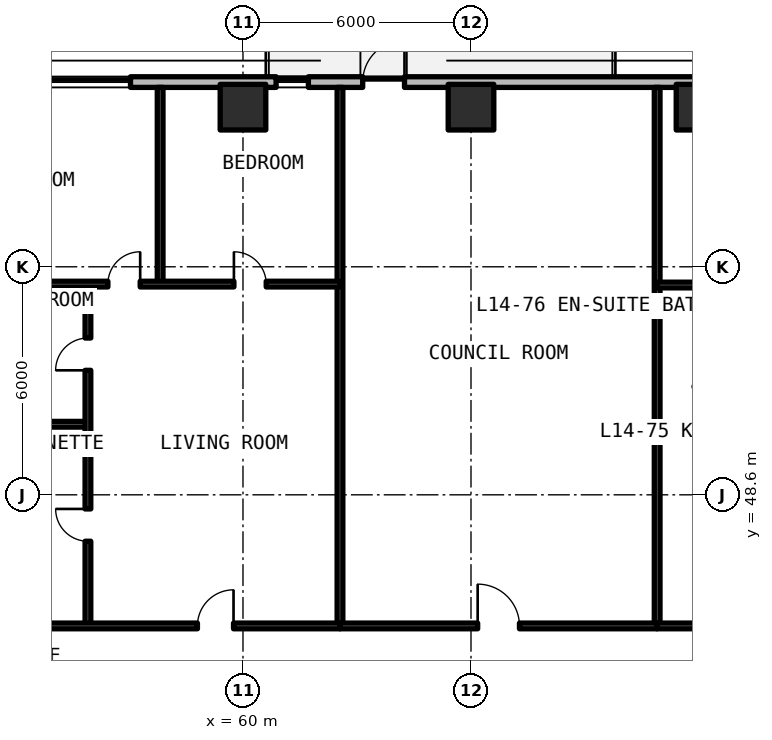
"""IFC4 building model, lengths in metres.
Left out: names, types, materials, properties, quantities, classifications, styles, units other than length and angle.
Written with IfcOpenShell. Run it as: python <this file> out.ifc"""

import sys

from ifc_helpers import new_model, si_unit, direction, frame, frame_2d, origin, origin_2d, place, context, subcontext, project, spatial, rectangle, extrude, element, fill, save


model = new_model("IFC4")
c1 = context("Model", 3, precision=1e-05, world=origin(), true_north=direction((0.0, 1.0)))
c2 = subcontext(c1, "Body", "Model", "MODEL_VIEW")
j1 = project(units=[si_unit("LENGTHUNIT", "METRE"), si_unit("PLANEANGLEUNIT", "RADIAN")], contexts=[c1])
p1 = place(None, origin())
s1 = spatial("IfcSite", under=j1, at=p1, CompositionType="ELEMENT")
p2 = place(p1, origin())
s2 = spatial("IfcBuilding", under=s1, at=p2, CompositionType="ELEMENT")
p3 = place(p2, frame((0.0, 0.0, 52.14)))
s3 = spatial("IfcBuildingStorey", under=s2, at=p3, CompositionType="ELEMENT", Elevation=52.14)
for number, where, z_axis, x_axis in (
    (1, (60.0, 58.8, 0.0), (0.0, 0.0, 1.0), (1.0, 0.0, 0.0)),
    (2, (66.0, 58.8, 0.0), (0.0, 0.0, 1.0), (1.0, 0.0, 0.0)),
    (3, (72.0, 58.8, 0.0), (0.0, 0.0, 1.0), (1.0, 0.0, 0.0)),
):
    element("IfcColumn", number, at=place(p3, frame(where, z_axis=z_axis, x_axis=x_axis)), inside=s3, PredefinedType="COLUMN", context=c2, shape_type="SweptSolid", body=[
        extrude(rectangle(XDim=1.2, YDim=1.2, at=origin_2d()), origin(), (0.0, 0.0, 1.0), 3.3),
    ])
p4 = place(p3, frame((96.542, 59.46, 0.0), z_axis=(0.0, 0.0, 1.0), x_axis=(-1.0, 0.0, 0.0)))
e4 = element("IfcWall", 4, at=p4, inside=s3, PredefinedType="SOLIDWALL", context=c2, shape_type="SweptSolid", body=[
    extrude(rectangle(XDim=44.402, YDim=0.28, at=frame_2d((22.201, 0.0))), origin(), (0.0, 0.0, 1.0), 3.08),
])
p5 = place(p4, frame((32.292, 0.0, 0.0)))
e5 = element("IfcOpeningElement", 5, at=p5, cuts=e4, PredefinedType="OPENING", context=c2, shape_type="SweptSolid", body=[
    extrude(rectangle(XDim=1.1, YDim=2.15, at=frame_2d((0.55, 1.075))), frame((0.0, 0.15, 0.0), z_axis=(0.0, -1.0, 0.0), x_axis=(1.0, 0.0, 0.0)), (0.0, 0.0, 1.0), 0.3),
])
p6 = place(p4, frame((20.692, 0.0, 0.0)))
e6 = element("IfcOpeningElement", 6, at=p6, cuts=e4, PredefinedType="OPENING", context=c2, shape_type="SweptSolid", body=[
    extrude(rectangle(XDim=1.1, YDim=2.15, at=frame_2d((0.55, 1.075))), frame((0.0, 0.15, 0.0), z_axis=(0.0, -1.0, 0.0), x_axis=(1.0, 0.0, 0.0)), (0.0, 0.0, 1.0), 0.3),
])
p7 = place(p4, frame((8.342, 0.0, 0.0)))
e7 = element("IfcOpeningElement", 7, at=p7, cuts=e4, PredefinedType="OPENING", context=c2, shape_type="SweptSolid", body=[
    extrude(rectangle(XDim=1.1, YDim=2.15, at=frame_2d((0.55, 1.075))), frame((0.0, 0.15, 0.0), z_axis=(0.0, -1.0, 0.0), x_axis=(1.0, 0.0, 0.0)), (0.0, 0.0, 1.0), 0.3),
])
p8 = place(p4, frame((39.502, 0.0, 0.78)))
e8 = element("IfcOpeningElement", 8, at=p8, cuts=e4, PredefinedType="OPENING", context=c2, shape_type="SweptSolid", body=[
    extrude(rectangle(XDim=2.2, YDim=1.66, at=frame_2d((1.1, 0.83))), frame((0.0, 0.15, 0.0), z_axis=(0.0, -1.0, 0.0), x_axis=(1.0, 0.0, 0.0)), (0.0, 0.0, 1.0), 0.3),
])
p9 = place(p4, frame((34.821, 0.0, 0.78)))
e9 = element("IfcOpeningElement", 9, at=p9, cuts=e4, PredefinedType="OPENING", context=c2, shape_type="SweptSolid", body=[
    extrude(rectangle(XDim=0.85, YDim=1.65, at=frame_2d((0.425, 0.825))), frame((0.0, 0.15, 0.0), z_axis=(0.0, -1.0, 0.0), x_axis=(1.0, 0.0, 0.0)), (0.0, 0.0, 1.0), 0.3),
])
p10 = place(p4, frame((15.472, 0.0, 0.78)))
e10 = element("IfcOpeningElement", 10, at=p10, cuts=e4, PredefinedType="OPENING", context=c2, shape_type="SweptSolid", body=[
    extrude(rectangle(XDim=2.2, YDim=1.66, at=frame_2d((1.1, 0.83))), frame((0.0, 0.15, 0.0), z_axis=(0.0, -1.0, 0.0), x_axis=(1.0, 0.0, 0.0)), (0.0, 0.0, 1.0), 0.3),
])
p11 = place(p4, frame((2.288, 0.0, 0.78)))
e11 = element("IfcOpeningElement", 11, at=p11, cuts=e4, PredefinedType="OPENING", context=c2, shape_type="SweptSolid", body=[
    extrude(rectangle(XDim=2.2, YDim=1.66, at=frame_2d((1.1, 0.83))), frame((0.0, 0.15, 0.0), z_axis=(0.0, -1.0, 0.0), x_axis=(1.0, 0.0, 0.0)), (0.0, 0.0, 1.0), 0.3),
])
p12 = place(p3, frame((62.552, 45.15, 0.0), z_axis=(0.0, 0.0, 1.0), x_axis=(0.0, 1.0, 0.0)))
e12 = element("IfcWall", 12, at=p12, inside=s3, PredefinedType="SOLIDWALL", context=c2, shape_type="SweptSolid", body=[
    extrude(rectangle(XDim=14.17, YDim=0.15, at=frame_2d((7.085, 0.0))), origin(), (0.0, 0.0, 1.0), 2.35),
])
p13 = place(p3, frame((52.12, 50.457, 0.0), z_axis=(0.0, 0.0, 1.0), x_axis=(1.0, 0.0, 0.0)))
e13 = element("IfcWall", 13, at=p13, inside=s3, PredefinedType="PARTITIONING", context=c2, shape_type="SweptSolid", body=[
    extrude(rectangle(XDim=3.8, YDim=0.15, at=frame_2d((1.9, 0.0))), origin(), (0.0, 0.0, 1.0), 2.35),
])
p14 = place(p3, frame((55.92, 45.15, 0.0), z_axis=(0.0, 0.0, 1.0), x_axis=(0.0, 1.0, 0.0)))
e14 = element("IfcWall", 14, at=p14, inside=s3, PredefinedType="PARTITIONING", context=c2, shape_type="SweptSolid", body=[
    extrude(rectangle(XDim=8.995, YDim=0.15, at=frame_2d((4.497, 0.0))), origin(), (0.0, 0.0, 1.0), 2.35),
])
p15 = place(p14, frame((2.229, 0.0, 0.0)))
e15 = element("IfcOpeningElement", 15, at=p15, cuts=e14, PredefinedType="OPENING", context=c2, shape_type="SweptSolid", body=[
    extrude(rectangle(XDim=0.85, YDim=2.1, at=frame_2d((0.425, 1.05))), frame((0.0, 0.085, 0.0), z_axis=(0.0, -1.0, 0.0), x_axis=(1.0, 0.0, 0.0)), (0.0, 0.0, 1.0), 0.17),
])
p16 = place(p14, frame((6.726, 0.0, 0.0)))
e16 = element("IfcOpeningElement", 16, at=p16, cuts=e14, PredefinedType="OPENING", context=c2, shape_type="SweptSolid", body=[
    extrude(rectangle(XDim=0.85, YDim=2.1, at=frame_2d((0.425, 1.05))), frame((0.0, 0.085, 0.0), z_axis=(0.0, -1.0, 0.0), x_axis=(1.0, 0.0, 0.0)), (0.0, 0.0, 1.0), 0.17),
])
p17 = place(p3, frame((57.82, 54.145, 0.0), z_axis=(0.0, 0.0, 1.0), x_axis=(0.0, 1.0, 0.0)))
e17 = element("IfcWall", 17, at=p17, inside=s3, PredefinedType="PARTITIONING", context=c2, shape_type="SweptSolid", body=[
    extrude(rectangle(XDim=5.176, YDim=0.15, at=frame_2d((2.588, 0.0))), origin(), (0.0, 0.0, 1.0), 2.35),
])
p18 = place(p3, frame((52.12, 54.145, 0.0), z_axis=(0.0, 0.0, 1.0), x_axis=(1.0, 0.0, 0.0)))
e18 = element("IfcWall", 18, at=p18, inside=s3, PredefinedType="PARTITIONING", context=c2, shape_type="SweptSolid", body=[
    extrude(rectangle(XDim=10.432, YDim=0.15, at=frame_2d((5.216, 0.0))), origin(), (0.0, 0.0, 1.0), 2.35),
])
p19 = place(p18, frame((4.325, 0.0, 0.0)))
e19 = element("IfcOpeningElement", 19, at=p19, cuts=e18, PredefinedType="OPENING", context=c2, shape_type="SweptSolid", body=[
    extrude(rectangle(XDim=0.85, YDim=2.1, at=frame_2d((0.425, 1.05))), frame((0.0, 0.085, 0.0), z_axis=(0.0, -1.0, 0.0), x_axis=(1.0, 0.0, 0.0)), (0.0, 0.0, 1.0), 0.17),
])
p20 = place(p18, frame((7.641, 0.0, 0.0)))
e20 = element("IfcOpeningElement", 20, at=p20, cuts=e18, PredefinedType="OPENING", context=c2, shape_type="SweptSolid", body=[
    extrude(rectangle(XDim=0.85, YDim=2.1, at=frame_2d((0.425, 1.05))), frame((0.0, 0.085, 0.0), z_axis=(0.0, -1.0, 0.0), x_axis=(1.0, 0.0, 0.0)), (0.0, 0.0, 1.0), 0.17),
])
p21 = place(p3, frame((52.12, 45.15, 0.0), z_axis=(0.0, 0.0, 1.0), x_axis=(1.0, 0.0, 0.0)))
e21 = element("IfcWall", 21, at=p21, inside=s3, PredefinedType="SOLIDWALL", context=c2, shape_type="SweptSolid", body=[
    extrude(rectangle(XDim=10.432, YDim=0.15, at=frame_2d((5.216, 0.0))), origin(), (0.0, 0.0, 1.0), 2.35),
])
p22 = place(p21, frame((6.681, 0.0, 0.0)))
e22 = element("IfcOpeningElement", 22, at=p22, cuts=e21, PredefinedType="OPENING", context=c2, shape_type="SweptSolid", body=[
    extrude(rectangle(XDim=0.95, YDim=2.15, at=frame_2d((0.475, 1.075))), frame((0.0, 0.085, 0.0), z_axis=(0.0, -1.0, 0.0), x_axis=(1.0, 0.0, 0.0)), (0.0, 0.0, 1.0), 0.17),
])
p23 = place(p3, frame((70.898, 45.15, 0.0), z_axis=(0.0, 0.0, 1.0), x_axis=(0.0, 1.0, 0.0)))
e23 = element("IfcWall", 23, at=p23, inside=s3, PredefinedType="SOLIDWALL", context=c2, shape_type="SweptSolid", body=[
    extrude(rectangle(XDim=14.17, YDim=0.15, at=frame_2d((7.085, 0.0))), origin(), (0.0, 0.0, 1.0), 2.35),
])
p24 = place(p3, frame((62.552, 45.15, 0.0), z_axis=(0.0, 0.0, 1.0), x_axis=(1.0, 0.0, 0.0)))
e24 = element("IfcWall", 24, at=p24, inside=s3, PredefinedType="SOLIDWALL", context=c2, shape_type="SweptSolid", body=[
    extrude(rectangle(XDim=8.346, YDim=0.15, at=frame_2d((4.173, 0.0))), origin(), (0.0, 0.0, 1.0), 2.35),
])
p25 = place(p24, frame((3.623, 0.0, 0.0)))
e25 = element("IfcOpeningElement", 25, at=p25, cuts=e24, PredefinedType="OPENING", context=c2, shape_type="SweptSolid", body=[
    extrude(rectangle(XDim=1.1, YDim=2.15, at=frame_2d((0.55, 1.075))), frame((0.0, 0.085, 0.0), z_axis=(0.0, -1.0, 0.0), x_axis=(1.0, 0.0, 0.0)), (0.0, 0.0, 1.0), 0.17),
])
p26 = place(p3, frame((70.898, 50.442, 0.0), z_axis=(0.0, 0.0, 1.0), x_axis=(1.0, 0.0, 0.0)))
e26 = element("IfcWall", 26, at=p26, inside=s3, PredefinedType="PARTITIONING", context=c2, shape_type="SweptSolid", body=[
    extrude(rectangle(XDim=3.021, YDim=0.15, at=frame_2d((1.511, 0.0))), origin(), (0.0, 0.0, 1.0), 2.35),
])
p27 = place(p3, frame((70.898, 54.12, 0.0), z_axis=(0.0, 0.0, 1.0), x_axis=(1.0, 0.0, 0.0)))
e27 = element("IfcWall", 27, at=p27, inside=s3, PredefinedType="PARTITIONING", context=c2, shape_type="SweptSolid", body=[
    extrude(rectangle(XDim=10.896, YDim=0.15, at=frame_2d((5.448, 0.0))), origin(), (0.0, 0.0, 1.0), 2.35),
])
p28 = place(p27, frame((3.919, 0.0, 0.0)))
e28 = element("IfcOpeningElement", 28, at=p28, cuts=e27, PredefinedType="OPENING", context=c2, shape_type="SweptSolid", body=[
    extrude(rectangle(XDim=0.85, YDim=2.1, at=frame_2d((0.425, 1.05))), frame((0.0, 0.085, 0.0), z_axis=(0.0, -1.0, 0.0), x_axis=(1.0, 0.0, 0.0)), (0.0, 0.0, 1.0), 0.17),
])
p29 = place(p27, frame((7.856, 0.0, 0.0)))
e29 = element("IfcOpeningElement", 29, at=p29, cuts=e27, PredefinedType="OPENING", context=c2, shape_type="SweptSolid", body=[
    extrude(rectangle(XDim=0.85, YDim=2.1, at=frame_2d((0.425, 1.05))), frame((0.0, 0.085, 0.0), z_axis=(0.0, -1.0, 0.0), x_axis=(1.0, 0.0, 0.0)), (0.0, 0.0, 1.0), 0.17),
])
p30 = place(p3, frame((70.898, 45.15, 0.0), z_axis=(0.0, 0.0, 1.0), x_axis=(1.0, 0.0, 0.0)))
e30 = element("IfcWall", 30, at=p30, inside=s3, PredefinedType="SOLIDWALL", context=c2, shape_type="SweptSolid", body=[
    extrude(rectangle(XDim=10.896, YDim=0.15, at=frame_2d((5.448, 0.0))), origin(), (0.0, 0.0, 1.0), 2.35),
])
p31 = place(p30, frame((6.524, 0.0, 0.0)))
e31 = element("IfcOpeningElement", 31, at=p31, cuts=e30, PredefinedType="OPENING", context=c2, shape_type="SweptSolid", body=[
    extrude(rectangle(XDim=0.95, YDim=2.15, at=frame_2d((0.475, 1.075))), frame((0.0, 0.085, 0.0), z_axis=(0.0, -1.0, 0.0), x_axis=(1.0, 0.0, 0.0)), (0.0, 0.0, 1.0), 0.17),
])
p32 = place(p5, frame((1.1, 0.0, 0.0), z_axis=(0.0, 0.0, 1.0), x_axis=(-1.0, 0.0, 0.0)))
e32 = element("IfcDoor", 32, at=p32, inside=s3, OperationType="SINGLE_SWING_LEFT", PredefinedType="DOOR", context=c2, shape_type="SweptSolid", body=[
    extrude(rectangle(XDim=1.1, YDim=2.15, at=frame_2d((0.55, 1.075))), frame((0.0, 0.025, 0.0), z_axis=(0.0, -1.0, 0.0), x_axis=(1.0, 0.0, 0.0)), (0.0, 0.0, 1.0), 0.05),
])
fill(e5, e32)
p33 = place(p8, origin())
e33 = element("IfcWindow", 33, at=p33, inside=s3, PartitioningType="SINGLE_PANEL", PredefinedType="WINDOW", context=c2, shape_type="SweptSolid", body=[
    extrude(rectangle(XDim=2.2, YDim=1.66, at=frame_2d((1.1, 0.83))), frame((0.0, 0.03, 0.0), z_axis=(0.0, -1.0, 0.0), x_axis=(1.0, 0.0, 0.0)), (0.0, 0.0, 1.0), 0.06),
])
fill(e8, e33)
p34 = place(p9, origin())
e34 = element("IfcWindow", 34, at=p34, inside=s3, PartitioningType="SINGLE_PANEL", PredefinedType="WINDOW", context=c2, shape_type="SweptSolid", body=[
    extrude(rectangle(XDim=0.85, YDim=1.65, at=frame_2d((0.425, 0.825))), frame((0.0, 0.03, 0.0), z_axis=(0.0, -1.0, 0.0), x_axis=(1.0, 0.0, 0.0)), (0.0, 0.0, 1.0), 0.06),
])
fill(e9, e34)
p35 = place(p15, origin())
e35 = element("IfcDoor", 35, at=p35, inside=s3, OperationType="SINGLE_SWING_RIGHT", PredefinedType="DOOR", context=c2, shape_type="SweptSolid", body=[
    extrude(rectangle(XDim=0.85, YDim=2.1, at=frame_2d((0.425, 1.05))), frame((0.0, 0.025, 0.0), z_axis=(0.0, -1.0, 0.0), x_axis=(1.0, 0.0, 0.0)), (0.0, 0.0, 1.0), 0.05),
])
fill(e15, e35)
p36 = place(p16, origin())
e36 = element("IfcDoor", 36, at=p36, inside=s3, OperationType="SINGLE_SWING_LEFT", PredefinedType="DOOR", context=c2, shape_type="SweptSolid", body=[
    extrude(rectangle(XDim=0.85, YDim=2.1, at=frame_2d((0.425, 1.05))), frame((0.0, 0.025, 0.0), z_axis=(0.0, -1.0, 0.0), x_axis=(1.0, 0.0, 0.0)), (0.0, 0.0, 1.0), 0.05),
])
fill(e16, e36)
p37 = place(p19, origin())
e37 = element("IfcDoor", 37, at=p37, inside=s3, OperationType="SINGLE_SWING_RIGHT", PredefinedType="DOOR", context=c2, shape_type="SweptSolid", body=[
    extrude(rectangle(XDim=0.85, YDim=2.1, at=frame_2d((0.425, 1.05))), frame((0.0, 0.025, 0.0), z_axis=(0.0, -1.0, 0.0), x_axis=(1.0, 0.0, 0.0)), (0.0, 0.0, 1.0), 0.05),
])
fill(e19, e37)
p38 = place(p20, origin())
e38 = element("IfcDoor", 38, at=p38, inside=s3, OperationType="SINGLE_SWING_LEFT", PredefinedType="DOOR", context=c2, shape_type="SweptSolid", body=[
    extrude(rectangle(XDim=0.85, YDim=2.1, at=frame_2d((0.425, 1.05))), frame((0.0, 0.025, 0.0), z_axis=(0.0, -1.0, 0.0), x_axis=(1.0, 0.0, 0.0)), (0.0, 0.0, 1.0), 0.05),
])
fill(e20, e38)
p39 = place(p22, origin())
e39 = element("IfcDoor", 39, at=p39, inside=s3, OperationType="SINGLE_SWING_RIGHT", PredefinedType="DOOR", context=c2, shape_type="SweptSolid", body=[
    extrude(rectangle(XDim=0.95, YDim=2.15, at=frame_2d((0.475, 1.075))), frame((0.0, 0.025, 0.0), z_axis=(0.0, -1.0, 0.0), x_axis=(1.0, 0.0, 0.0)), (0.0, 0.0, 1.0), 0.05),
])
fill(e22, e39)
p40 = place(p25, origin())
e40 = element("IfcDoor", 40, at=p40, inside=s3, OperationType="SINGLE_SWING_LEFT", PredefinedType="DOOR", context=c2, shape_type="SweptSolid", body=[
    extrude(rectangle(XDim=1.1, YDim=2.15, at=frame_2d((0.55, 1.075))), frame((0.0, 0.025, 0.0), z_axis=(0.0, -1.0, 0.0), x_axis=(1.0, 0.0, 0.0)), (0.0, 0.0, 1.0), 0.05),
])
fill(e25, e40)
save(model, sys.argv[1])
